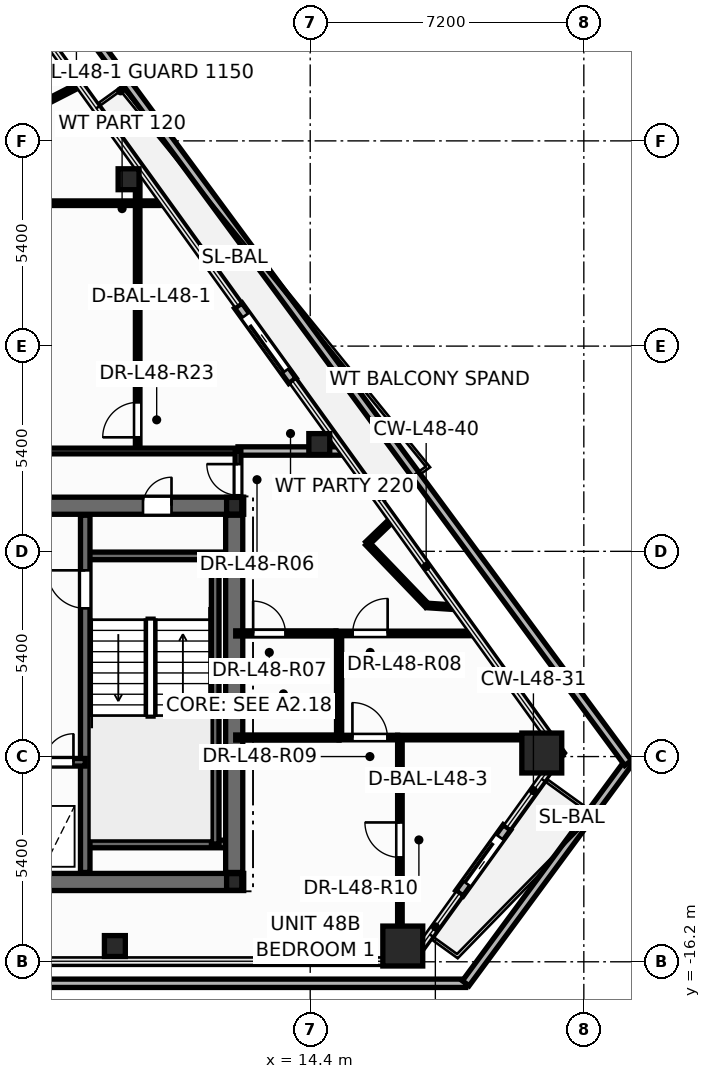
"""IFC4 building model, lengths in metres.
Left out: names, types, materials, properties, quantities, classifications, styles, units other than length and angle.
Written with IfcOpenShell. Run it as: python <this file> out.ifc"""

import sys

from ifc_helpers import new_model, si_unit, direction, frame, frame_2d, origin, origin_2d, place, context, subcontext, project, spatial, rectangle, hollow_rectangle, hollow_circle, i_section, extrude, element, fill, save


model = new_model("IFC4")
c1 = context("Model", 3, precision=1e-05, world=origin(), true_north=direction((0.0, 1.0)))
c2 = subcontext(c1, "Body", "Model", "MODEL_VIEW")
j1 = project(units=[si_unit("LENGTHUNIT", "METRE"), si_unit("PLANEANGLEUNIT", "RADIAN")], contexts=[c1])
p1 = place(None, origin())
s1 = spatial("IfcSite", under=j1, at=p1, CompositionType="ELEMENT")
p2 = place(p1, origin())
s2 = spatial("IfcBuilding", under=s1, at=p2, CompositionType="ELEMENT")
p3 = place(p2, frame((0.0, 0.0, 185.7)))
s3 = spatial("IfcBuildingStorey", under=s2, at=p3, CompositionType="ELEMENT", Elevation=185.7)
for number, where, z_axis, x_axis in (
    (1, (16.836, -15.786, 0.0), (0.0, 0.0, 1.0), (1.0, 0.0, 0.0)),
    (2, (20.494, -10.707, 0.0), (0.0, 0.0, 1.0), (1.0, 0.0, 0.0)),
):
    element("IfcColumn", number, at=place(p3, frame(where, z_axis=z_axis, x_axis=x_axis)), inside=s3, PredefinedType="COLUMN", context=c2, shape_type="SweptSolid", body=[
        extrude(hollow_rectangle(XDim=1.05, YDim=1.05, WallThickness=0.045, at=origin_2d()), origin(), (0.0, 0.0, 1.0), 3.6),
    ])
for number, where, z_axis, x_axis in (
    (3, (9.26, -15.786, 0.0), (0.0, 0.0, 1.0), (1.0, 0.0, 0.0)),
    (4, (14.639, -2.577, 0.0), (0.0, 0.0, 1.0), (1.0, 0.0, 0.0)),
    (5, (9.621, 4.391, 0.0), (0.0, 0.0, 1.0), (1.0, 0.0, 0.0)),
):
    element("IfcColumn", number, at=place(p3, frame(where, z_axis=z_axis, x_axis=x_axis)), inside=s3, PredefinedType="COLUMN", context=c2, shape_type="SweptSolid", body=[
        extrude(hollow_circle(Radius=0.275, WallThickness=0.024, at=origin_2d()), origin(), (0.0, 0.0, 1.0), 3.6),
    ])
for number, where, z_axis, x_axis in (
    (6, (12.4, -14.1, 0.0), (0.0, 0.0, 1.0), (1.0, 0.0, 0.0)),
    (7, (12.4, -4.2, 0.0), (0.0, 0.0, 1.0), (1.0, 0.0, 0.0)),
):
    element("IfcColumn", number, at=place(p3, frame(where, z_axis=z_axis, x_axis=x_axis)), inside=s3, PredefinedType="COLUMN", context=c2, shape_type="SweptSolid", body=[
        extrude(i_section(OverallWidth=0.4, OverallDepth=0.44, WebThickness=0.028, FlangeThickness=0.04, at=origin_2d()), origin(), (0.0, 0.0, 1.0), 3.6),
    ])
p4 = place(p3, frame((-18.493, -16.766, -0.02), z_axis=(0.0, 0.0, 1.0), x_axis=(1.0, 0.0, 0.0)))
e8 = element("IfcWall", 8, at=p4, inside=s3, PredefinedType="PARAPET", context=c2, shape_type="SweptSolid", body=[
    extrude(rectangle(XDim=36.985, YDim=0.22, at=frame_2d((18.493, 0.0))), origin(), (0.0, 0.0, 1.0), 1.17),
])
p5 = place(p3, frame((18.493, -16.766, -0.02), z_axis=(0.0, 0.0, 1.0), x_axis=(0.593481202181, 0.804847850627, 0.0)))
e9 = element("IfcWall", 9, at=p5, inside=s3, PredefinedType="PARAPET", context=c2, shape_type="SweptSolid", body=[
    extrude(rectangle(XDim=7.201, YDim=0.22, at=frame_2d((3.6, 0.0))), origin(), (0.0, 0.0, 1.0), 1.17),
])
p6 = place(p3, frame((22.766, -10.97, -0.02), z_axis=(0.0, 0.0, 1.0), x_axis=(-0.593493783315, 0.804838573359, 0.0)))
e10 = element("IfcWall", 10, at=p6, inside=s3, PredefinedType="PARAPET", context=c2, shape_type="SweptSolid", body=[
    extrude(rectangle(XDim=31.104, YDim=0.22, at=frame_2d((15.552, 0.0))), origin(), (0.0, 0.0, 1.0), 1.17),
])
p7 = place(p3, frame((13.934, -0.914, -0.015), z_axis=(0.0, 0.0, 1.0), x_axis=(-0.584423331063, 0.811448932533, 0.0)))
e11 = element("IfcWall", 11, at=p7, inside=s3, PredefinedType="STANDARD", context=c2, shape_type="SweptSolid", body=[
    extrude(rectangle(XDim=2.44, YDim=0.24, at=frame_2d((1.22, 0.0))), origin(), (0.0, 0.0, 1.0), 2.807),
])
p8 = place(p7, frame((0.32, 0.0, 0.015)))
e12 = element("IfcOpeningElement", 12, at=p8, cuts=e11, PredefinedType="OPENING", context=c2, shape_type="SweptSolid", body=[
    extrude(rectangle(XDim=1.806, YDim=2.204, at=frame_2d((0.9, 1.102))), frame((0.0, 0.13, 0.0), z_axis=(0.0, -1.0, 0.0), x_axis=(1.0, 0.0, 0.0)), (0.0, 0.0, 1.0), 0.26),
])
p9 = place(p3, frame((18.328, -14.399, -0.015), z_axis=(0.0, 0.0, 1.0), x_axis=(0.584352812003, 0.811499717255, 0.0)))
e13 = element("IfcWall", 13, at=p9, inside=s3, PredefinedType="STANDARD", context=c2, shape_type="SweptSolid", body=[
    extrude(rectangle(XDim=2.14, YDim=0.24, at=frame_2d((1.07, 0.0))), origin(), (0.0, 0.0, 1.0), 2.807),
])
p10 = place(p9, frame((0.32, 0.0, 0.015)))
e14 = element("IfcOpeningElement", 14, at=p10, cuts=e13, PredefinedType="OPENING", context=c2, shape_type="SweptSolid", body=[
    extrude(rectangle(XDim=1.506, YDim=2.204, at=frame_2d((0.75, 1.102))), frame((0.0, 0.13, 0.0), z_axis=(0.0, -1.0, 0.0), x_axis=(1.0, 0.0, 0.0)), (0.0, 0.0, 1.0), 0.26),
])
p11 = place(p3, frame((-12.65, -14.1, 0.0), z_axis=(0.0, 0.0, 1.0), x_axis=(1.0, 0.0, 0.0)))
e15 = element("IfcWall", 15, at=p11, inside=s3, PredefinedType="SHEAR", context=c2, shape_type="SweptSolid", body=[
    extrude(rectangle(XDim=25.3, YDim=0.45, at=frame_2d((12.65, 0.0))), origin(), (0.0, 0.0, 1.0), 3.6),
])
p12 = place(p3, frame((-12.65, -4.2, 0.0), z_axis=(0.0, 0.0, 1.0), x_axis=(1.0, 0.0, 0.0)))
e16 = element("IfcWall", 16, at=p12, inside=s3, PredefinedType="SHEAR", context=c2, shape_type="SweptSolid", body=[
    extrude(rectangle(XDim=25.3, YDim=0.45, at=frame_2d((12.65, 0.0))), origin(), (0.0, 0.0, 1.0), 3.6),
])
p13 = place(p12, frame((1.85, 0.0, 0.0)))
e17 = element("IfcOpeningElement", 17, at=p13, cuts=e16, PredefinedType="OPENING", context=c2, shape_type="SweptSolid", body=[
    extrude(rectangle(XDim=0.756, YDim=2.054, at=frame_2d((0.375, 1.027))), frame((0.0, 0.235, 0.0), z_axis=(0.0, -1.0, 0.0), x_axis=(1.0, 0.0, 0.0)), (0.0, 0.0, 1.0), 0.47),
])
p14 = place(p12, frame((22.65, 0.0, 0.0)))
e18 = element("IfcOpeningElement", 18, at=p14, cuts=e16, PredefinedType="OPENING", context=c2, shape_type="SweptSolid", body=[
    extrude(rectangle(XDim=0.756, YDim=2.054, at=frame_2d((0.375, 1.027))), frame((0.0, 0.235, 0.0), z_axis=(0.0, -1.0, 0.0), x_axis=(1.0, 0.0, 0.0)), (0.0, 0.0, 1.0), 0.47),
])
p15 = place(p12, frame((5.85, 0.0, 0.0)))
e19 = element("IfcOpeningElement", 19, at=p15, cuts=e16, PredefinedType="OPENING", context=c2, shape_type="SweptSolid", body=[
    extrude(rectangle(XDim=1.006, YDim=2.104, at=frame_2d((0.5, 1.052))), frame((0.0, 0.235, 0.0), z_axis=(0.0, -1.0, 0.0), x_axis=(1.0, 0.0, 0.0)), (0.0, 0.0, 1.0), 0.47),
])
p16 = place(p12, frame((10.35, 0.0, 0.0)))
e20 = element("IfcOpeningElement", 20, at=p16, cuts=e16, PredefinedType="OPENING", context=c2, shape_type="SweptSolid", body=[
    extrude(rectangle(XDim=1.406, YDim=2.154, at=frame_2d((0.7, 1.077))), frame((0.0, 0.235, 0.0), z_axis=(0.0, -1.0, 0.0), x_axis=(1.0, 0.0, 0.0)), (0.0, 0.0, 1.0), 0.47),
])
p17 = place(p12, frame((18.45, 0.0, 0.0)))
e21 = element("IfcOpeningElement", 21, at=p17, cuts=e16, PredefinedType="OPENING", context=c2, shape_type="SweptSolid", body=[
    extrude(rectangle(XDim=1.006, YDim=2.104, at=frame_2d((0.5, 1.052))), frame((0.0, 0.235, 0.0), z_axis=(0.0, -1.0, 0.0), x_axis=(1.0, 0.0, 0.0)), (0.0, 0.0, 1.0), 0.47),
])
for number, where, z_axis, x_axis in (
    (22, (8.48, -5.52, 0.0), (0.0, 0.0, 1.0), (1.0, 0.0, 0.0)),
    (23, (8.48, -13.1, 0.0), (0.0, 0.0, 1.0), (1.0, 0.0, 0.0)),
):
    element("IfcWall", number, at=place(p3, frame(where, z_axis=z_axis, x_axis=x_axis)), inside=s3, PredefinedType="SOLIDWALL", context=c2, shape_type="SweptSolid", body=[
        extrude(rectangle(XDim=3.87, YDim=0.2, at=frame_2d((1.935, 0.0))), origin(), (0.0, 0.0, 1.0), 3.6),
    ])
p18 = place(p3, frame((11.9, -13.1, 0.0), z_axis=(0.0, 0.0, 1.0), x_axis=(0.0, 1.0, 0.0)))
e24 = element("IfcWall", 24, at=p18, inside=s3, PredefinedType="SOLIDWALL", context=c2, shape_type="SweptSolid", body=[
    extrude(rectangle(XDim=7.58, YDim=0.2, at=frame_2d((3.79, 0.0))), origin(), (0.0, 0.0, 1.0), 3.6),
])
p19 = place(p3, frame((8.48, -13.85, 0.0), z_axis=(0.0, 0.0, 1.0), x_axis=(0.0, 1.0, 0.0)))
e25 = element("IfcWall", 25, at=p19, inside=s3, PredefinedType="SHEAR", context=c2, shape_type="SweptSolid", body=[
    extrude(rectangle(XDim=9.4, YDim=0.25, at=frame_2d((4.7, 0.0))), origin(), (0.0, 0.0, 1.0), 3.6),
])
p20 = place(p19, frame((6.95, 0.0, 0.0)))
e26 = element("IfcOpeningElement", 26, at=p20, cuts=e25, PredefinedType="OPENING", context=c2, shape_type="SweptSolid", body=[
    extrude(rectangle(XDim=1.006, YDim=2.104, at=frame_2d((0.5, 1.052))), frame((0.0, 0.135, 0.0), z_axis=(0.0, -1.0, 0.0), x_axis=(1.0, 0.0, 0.0)), (0.0, 0.0, 1.0), 0.27),
])
p21 = place(p3, frame((5.12, -10.95, 0.0), z_axis=(0.0, 0.0, 1.0), x_axis=(1.0, 0.0, 0.0)))
e27 = element("IfcWall", 27, at=p21, inside=s3, PredefinedType="SOLIDWALL", context=c2, shape_type="SweptSolid", body=[
    extrude(rectangle(XDim=3.36, YDim=0.2, at=frame_2d((1.68, 0.0))), origin(), (0.0, 0.0, 1.0), 3.6),
])
p22 = place(p21, frame((0.42, 0.0, 0.0)))
e28 = element("IfcOpeningElement", 28, at=p22, cuts=e27, PredefinedType="OPENING", context=c2, shape_type="SweptSolid", body=[
    extrude(rectangle(XDim=1.106, YDim=2.104, at=frame_2d((0.55, 1.052))), frame((0.0, 0.11, 0.0), z_axis=(0.0, -1.0, 0.0), x_axis=(1.0, 0.0, 0.0)), (0.0, 0.0, 1.0), 0.22),
])
p23 = place(p21, frame((2.3, 0.0, 0.0)))
e29 = element("IfcOpeningElement", 29, at=p23, cuts=e27, PredefinedType="OPENING", context=c2, shape_type="SweptSolid", body=[
    extrude(rectangle(XDim=0.756, YDim=2.054, at=frame_2d((0.375, 1.027))), frame((0.0, 0.11, 0.0), z_axis=(0.0, -1.0, 0.0), x_axis=(1.0, 0.0, 0.0)), (0.0, 0.0, 1.0), 0.22),
])
p24 = place(p3, frame((12.4, -13.85, 0.0), z_axis=(0.0, 0.0, 1.0), x_axis=(0.0, 1.0, 0.0)))
e30 = element("IfcWall", 30, at=p24, inside=s3, PredefinedType="SHEAR", context=c2, shape_type="SweptSolid", body=[
    extrude(rectangle(XDim=9.4, YDim=0.45, at=frame_2d((4.7, 0.0))), origin(), (0.0, 0.0, 1.0), 3.6),
])
p25 = place(p3, frame((9.86, -2.76, 0.0), z_axis=(0.0, 0.0, 1.0), x_axis=(0.0, 1.0, 0.0)))
e31 = element("IfcWall", 31, at=p25, inside=s3, PredefinedType="PARTITIONING", context=c2, shape_type="SweptSolid", body=[
    extrude(rectangle(XDim=7.503, YDim=0.12, at=frame_2d((3.751, 0.0))), origin(), (0.0, 0.0, 1.0), 2.325),
])
p26 = place(p25, frame((0.36, 0.0, 0.0)))
e32 = element("IfcOpeningElement", 32, at=p26, cuts=e31, PredefinedType="OPENING", context=c2, shape_type="SweptSolid", body=[
    extrude(rectangle(XDim=0.926, YDim=2.104, at=frame_2d((0.46, 1.052))), frame((0.0, 0.07, 0.0), z_axis=(0.0, -1.0, 0.0), x_axis=(1.0, 0.0, 0.0)), (0.0, 0.0, 1.0), 0.14),
])
p27 = place(p3, frame((16.76, -16.186, 0.0), z_axis=(0.0, 0.0, 1.0), x_axis=(0.0, 1.0, 0.0)))
e33 = element("IfcWall", 33, at=p27, inside=s3, PredefinedType="PARTITIONING", context=c2, shape_type="SweptSolid", body=[
    extrude(rectangle(XDim=5.885, YDim=0.12, at=frame_2d((2.943, 0.0))), origin(), (0.0, 0.0, 1.0), 2.325),
])
p28 = place(p27, frame((2.732, 0.0, 0.0)))
e34 = element("IfcOpeningElement", 34, at=p28, cuts=e33, PredefinedType="OPENING", context=c2, shape_type="SweptSolid", body=[
    extrude(rectangle(XDim=0.926, YDim=2.104, at=frame_2d((0.46, 1.052))), frame((0.0, 0.07, 0.0), z_axis=(0.0, -1.0, 0.0), x_axis=(1.0, 0.0, 0.0)), (0.0, 0.0, 1.0), 0.14),
])
p29 = place(p3, frame((5.16, 3.76, 0.0), z_axis=(0.0, 0.0, 1.0), x_axis=(1.0, 0.0, 0.0)))
e35 = element("IfcWall", 35, at=p29, inside=s3, PredefinedType="PARTITIONING", context=c2, shape_type="SweptSolid", body=[
    extrude(rectangle(XDim=5.408, YDim=0.12, at=frame_2d((2.704, 0.0))), origin(), (0.0, 0.0, 1.0), 2.325),
])
p30 = place(p29, frame((0.4, 0.0, 0.0)))
e36 = element("IfcOpeningElement", 36, at=p30, cuts=e35, PredefinedType="OPENING", context=c2, shape_type="SweptSolid", body=[
    extrude(rectangle(XDim=0.926, YDim=2.104, at=frame_2d((0.46, 1.052))), frame((0.0, 0.07, 0.0), z_axis=(0.0, -1.0, 0.0), x_axis=(1.0, 0.0, 0.0)), (0.0, 0.0, 1.0), 0.14),
])
p31 = place(p3, frame((-4.398, -2.76, 0.0), z_axis=(0.0, 0.0, 1.0), x_axis=(1.0, 0.0, 0.0)))
e37 = element("IfcWall", 37, at=p31, inside=s3, PredefinedType="PARTITIONING", context=c2, shape_type="SweptSolid", body=[
    extrude(rectangle(XDim=16.898, YDim=0.15, at=frame_2d((8.449, 0.0))), origin(), (0.0, 0.0, 1.0), 2.325),
])
p32 = place(p3, frame((16.7, -10.3, 0.0), z_axis=(0.0, 0.0, 1.0), x_axis=(1.0, 0.0, 0.0)))
e38 = element("IfcWall", 38, at=p32, inside=s3, PredefinedType="PARTITIONING", context=c2, shape_type="SweptSolid", body=[
    extrude(rectangle(XDim=3.994, YDim=0.12, at=frame_2d((1.997, 0.0))), origin(), (0.0, 0.0, 1.0), 2.325),
])
p33 = place(p3, frame((15.08, -7.56, 0.0), z_axis=(0.0, 0.0, 1.0), x_axis=(1.0, 0.0, 0.0)))
e39 = element("IfcWall", 39, at=p33, inside=s3, PredefinedType="PARTITIONING", context=c2, shape_type="SweptSolid", body=[
    extrude(rectangle(XDim=3.64, YDim=0.12, at=frame_2d((1.82, 0.0))), origin(), (0.0, 0.0, 1.0), 2.325),
])
p34 = place(p33, frame((0.438, 0.0, 0.0)))
e40 = element("IfcOpeningElement", 40, at=p34, cuts=e39, PredefinedType="OPENING", context=c2, shape_type="SweptSolid", body=[
    extrude(rectangle(XDim=0.926, YDim=2.104, at=frame_2d((0.46, 1.052))), frame((0.0, 0.07, 0.0), z_axis=(0.0, -1.0, 0.0), x_axis=(1.0, 0.0, 0.0)), (0.0, 0.0, 1.0), 0.14),
])
p35 = place(p3, frame((12.5, -2.76, 0.0), z_axis=(0.0, 0.0, 1.0), x_axis=(1.0, 0.0, 0.0)))
e41 = element("IfcWall", 41, at=p35, inside=s3, PredefinedType="PARTITIONING", context=c2, shape_type="SweptSolid", body=[
    extrude(rectangle(XDim=2.763, YDim=0.22, at=frame_2d((1.382, 0.0))), origin(), (0.0, 0.0, 1.0), 2.325),
])
p36 = place(p3, frame((12.44, -7.56, 0.0), z_axis=(0.0, 0.0, 1.0), x_axis=(1.0, 0.0, 0.0)))
e42 = element("IfcWall", 42, at=p36, inside=s3, PredefinedType="PARTITIONING", context=c2, shape_type="SweptSolid", body=[
    extrude(rectangle(XDim=2.638, YDim=0.135, at=frame_2d((1.319, 0.0))), origin(), (0.0, 0.0, 1.0), 2.792),
])
p37 = place(p36, frame((0.458, 0.0, 0.0)))
e43 = element("IfcOpeningElement", 43, at=p37, cuts=e42, PredefinedType="OPENING", context=c2, shape_type="SweptSolid", body=[
    extrude(rectangle(XDim=0.856, YDim=2.104, at=frame_2d((0.425, 1.052))), frame((0.0, 0.078, 0.0), z_axis=(0.0, -1.0, 0.0), x_axis=(1.0, 0.0, 0.0)), (0.0, 0.0, 1.0), 0.155),
])
p38 = place(p3, frame((15.16, -10.3, 0.0), z_axis=(0.0, 0.0, 1.0), x_axis=(0.0, 1.0, 0.0)))
e44 = element("IfcWall", 44, at=p38, inside=s3, PredefinedType="PARTITIONING", context=c2, shape_type="SweptSolid", body=[
    extrude(rectangle(XDim=2.74, YDim=0.135, at=frame_2d((1.37, 0.0))), origin(), (0.0, 0.0, 1.0), 3.35),
])
p39 = place(p3, frame((12.44, -10.3, 0.0), z_axis=(0.0, 0.0, 1.0), x_axis=(1.0, 0.0, 0.0)))
e45 = element("IfcWall", 45, at=p39, inside=s3, PredefinedType="PARTITIONING", context=c2, shape_type="SweptSolid", body=[
    extrude(rectangle(XDim=2.72, YDim=0.135, at=frame_2d((1.36, 0.0))), origin(), (0.0, 0.0, 1.0), 2.792),
])
p40 = place(p3, frame((17.471, -6.823, 0.0), z_axis=(0.0, 0.0, 1.0), x_axis=(-0.692938318289, 0.720996870345, 0.0)))
e46 = element("IfcWall", 46, at=p40, inside=s3, PredefinedType="PARTITIONING", context=c2, shape_type="SweptSolid", body=[
    extrude(rectangle(XDim=2.262, YDim=0.12, at=frame_2d((1.131, 0.0))), origin(), (0.0, 0.0, 1.0), 3.35),
])
p41 = place(p3, frame((15.16, -10.3, 0.0), z_axis=(0.0, 0.0, 1.0), x_axis=(1.0, 0.0, 0.0)))
e47 = element("IfcWall", 47, at=p41, inside=s3, PredefinedType="PARTITIONING", context=c2, shape_type="SweptSolid", body=[
    extrude(rectangle(XDim=1.538, YDim=0.12, at=frame_2d((0.769, 0.0))), origin(), (0.0, 0.0, 1.0), 3.35),
])
p42 = place(p41, frame((0.351, 0.0, 0.0)))
e48 = element("IfcOpeningElement", 48, at=p42, cuts=e47, PredefinedType="OPENING", context=c2, shape_type="SweptSolid", body=[
    extrude(rectangle(XDim=0.926, YDim=2.104, at=frame_2d((0.46, 1.052))), frame((0.0, 0.07, 0.0), z_axis=(0.0, -1.0, 0.0), x_axis=(1.0, 0.0, 0.0)), (0.0, 0.0, 1.0), 0.14),
])
p43 = place(p3, frame((12.5, -4.24, 0.0), z_axis=(0.0, 0.0, 1.0), x_axis=(0.0, 1.0, 0.0)))
e49 = element("IfcWall", 49, at=p43, inside=s3, PredefinedType="PARTITIONING", context=c2, shape_type="SweptSolid", body=[
    extrude(rectangle(XDim=1.48, YDim=0.15, at=frame_2d((0.74, 0.0))), origin(), (0.0, 0.0, 1.0), 2.325),
])
p44 = place(p43, frame((0.315, 0.0, 0.0)))
e50 = element("IfcOpeningElement", 50, at=p44, cuts=e49, PredefinedType="OPENING", context=c2, shape_type="SweptSolid", body=[
    extrude(rectangle(XDim=0.826, YDim=2.104, at=frame_2d((0.41, 1.052))), frame((0.0, 0.085, 0.0), z_axis=(0.0, -1.0, 0.0), x_axis=(1.0, 0.0, 0.0)), (0.0, 0.0, 1.0), 0.17),
])
p45 = place(p3, frame((15.903, -5.192, 0.0), z_axis=(0.0, 0.0, 1.0), x_axis=(0.72092156137, 0.693016668164, 0.0)))
e51 = element("IfcWall", 51, at=p45, inside=s3, PredefinedType="PARTITIONING", context=c2, shape_type="SweptSolid", body=[
    extrude(rectangle(XDim=0.901, YDim=0.12, at=frame_2d((0.451, 0.0))), origin(), (0.0, 0.0, 1.0), 2.792),
])
p46 = place(p3, frame((8.319, 6.866, 0.0), z_axis=(0.0, 0.0, 1.0), x_axis=(-0.889930495704, -0.456096166194, 0.0)))
e52 = element("IfcWall", 52, at=p46, inside=s3, PredefinedType="PARTITIONING", context=c2, shape_type="SweptSolid", body=[
    extrude(rectangle(XDim=0.899, YDim=0.12, at=frame_2d((0.45, 0.0))), origin(), (0.0, 0.0, 1.0), 2.792),
])
p47 = place(p3, frame((18.213, -6.873, 0.0), z_axis=(0.0, 0.0, 1.0), x_axis=(-0.997799657242, 0.066301161435, 0.0)))
e53 = element("IfcWall", 53, at=p47, inside=s3, PredefinedType="PARTITIONING", context=c2, shape_type="SweptSolid", body=[
    extrude(rectangle(XDim=0.744, YDim=0.12, at=frame_2d((0.372, 0.0))), origin(), (0.0, 0.0, 1.0), 2.792),
])
p48 = place(p8, origin())
e54 = element("IfcDoor", 54, at=p48, inside=s3, OperationType="SLIDING_TO_LEFT", PredefinedType="DOOR", context=c2, shape_type="SweptSolid", body=[
    extrude(rectangle(XDim=1.8, YDim=2.2, at=frame_2d((0.9, 1.1))), frame((0.0, 0.025, 0.0), z_axis=(0.0, -1.0, 0.0), x_axis=(1.0, 0.0, 0.0)), (0.0, 0.0, 1.0), 0.05),
])
fill(e12, e54)
p49 = place(p10, origin())
e55 = element("IfcDoor", 55, at=p49, inside=s3, OperationType="SLIDING_TO_RIGHT", PredefinedType="DOOR", context=c2, shape_type="SweptSolid", body=[
    extrude(rectangle(XDim=1.5, YDim=2.2, at=frame_2d((0.75, 1.1))), frame((0.0, 0.025, 0.0), z_axis=(0.0, -1.0, 0.0), x_axis=(1.0, 0.0, 0.0)), (0.0, 0.0, 1.0), 0.05),
])
fill(e14, e55)
p50 = place(p20, origin())
e56 = element("IfcDoor", 56, at=p50, inside=s3, OperationType="SINGLE_SWING_RIGHT", PredefinedType="DOOR", context=c2, shape_type="SweptSolid", body=[
    extrude(rectangle(XDim=1.0, YDim=2.1, at=frame_2d((0.5, 1.05))), frame((0.0, 0.025, 0.0), z_axis=(0.0, -1.0, 0.0), x_axis=(1.0, 0.0, 0.0)), (0.0, 0.0, 1.0), 0.05),
])
fill(e26, e56)
p51 = place(p23, origin())
e57 = element("IfcDoor", 57, at=p51, inside=s3, OperationType="SINGLE_SWING_RIGHT", PredefinedType="DOOR", context=c2, shape_type="SweptSolid", body=[
    extrude(rectangle(XDim=0.75, YDim=2.05, at=frame_2d((0.375, 1.025))), frame((0.0, 0.025, 0.0), z_axis=(0.0, -1.0, 0.0), x_axis=(1.0, 0.0, 0.0)), (0.0, 0.0, 1.0), 0.05),
])
fill(e29, e57)
p52 = place(p14, origin())
e58 = element("IfcDoor", 58, at=p52, inside=s3, OperationType="SINGLE_SWING_RIGHT", PredefinedType="DOOR", context=c2, shape_type="SweptSolid", body=[
    extrude(rectangle(XDim=0.75, YDim=2.05, at=frame_2d((0.375, 1.025))), frame((0.0, 0.025, 0.0), z_axis=(0.0, -1.0, 0.0), x_axis=(1.0, 0.0, 0.0)), (0.0, 0.0, 1.0), 0.05),
])
fill(e18, e58)
p53 = place(p44, origin())
e59 = element("IfcDoor", 59, at=p53, inside=s3, OperationType="SINGLE_SWING_RIGHT", PredefinedType="DOOR", context=c2, shape_type="SweptSolid", body=[
    extrude(rectangle(XDim=0.82, YDim=2.1, at=frame_2d((0.41, 1.05))), frame((0.0, 0.025, 0.0), z_axis=(0.0, -1.0, 0.0), x_axis=(1.0, 0.0, 0.0)), (0.0, 0.0, 1.0), 0.05),
])
fill(e50, e59)
p54 = place(p37, origin())
e60 = element("IfcDoor", 60, at=p54, inside=s3, OperationType="SINGLE_SWING_LEFT", PredefinedType="DOOR", context=c2, shape_type="SweptSolid", body=[
    extrude(rectangle(XDim=0.85, YDim=2.1, at=frame_2d((0.425, 1.05))), frame((0.0, 0.025, 0.0), z_axis=(0.0, -1.0, 0.0), x_axis=(1.0, 0.0, 0.0)), (0.0, 0.0, 1.0), 0.05),
])
fill(e43, e60)
p55 = place(p34, origin())
e61 = element("IfcDoor", 61, at=p55, inside=s3, OperationType="SINGLE_SWING_RIGHT", PredefinedType="DOOR", context=c2, shape_type="SweptSolid", body=[
    extrude(rectangle(XDim=0.92, YDim=2.1, at=frame_2d((0.46, 1.05))), frame((0.0, 0.025, 0.0), z_axis=(0.0, -1.0, 0.0), x_axis=(1.0, 0.0, 0.0)), (0.0, 0.0, 1.0), 0.05),
])
fill(e40, e61)
p56 = place(p42, origin())
e62 = element("IfcDoor", 62, at=p56, inside=s3, OperationType="SINGLE_SWING_LEFT", PredefinedType="DOOR", context=c2, shape_type="SweptSolid", body=[
    extrude(rectangle(XDim=0.92, YDim=2.1, at=frame_2d((0.46, 1.05))), frame((0.0, 0.025, 0.0), z_axis=(0.0, -1.0, 0.0), x_axis=(1.0, 0.0, 0.0)), (0.0, 0.0, 1.0), 0.05),
])
fill(e48, e62)
p57 = place(p28, origin())
e63 = element("IfcDoor", 63, at=p57, inside=s3, OperationType="SINGLE_SWING_RIGHT", PredefinedType="DOOR", context=c2, shape_type="SweptSolid", body=[
    extrude(rectangle(XDim=0.92, YDim=2.1, at=frame_2d((0.46, 1.05))), frame((0.0, 0.025, 0.0), z_axis=(0.0, -1.0, 0.0), x_axis=(1.0, 0.0, 0.0)), (0.0, 0.0, 1.0), 0.05),
])
fill(e34, e63)
p58 = place(p26, origin())
e64 = element("IfcDoor", 64, at=p58, inside=s3, OperationType="SINGLE_SWING_LEFT", PredefinedType="DOOR", context=c2, shape_type="SweptSolid", body=[
    extrude(rectangle(XDim=0.92, YDim=2.1, at=frame_2d((0.46, 1.05))), frame((0.0, 0.025, 0.0), z_axis=(0.0, -1.0, 0.0), x_axis=(1.0, 0.0, 0.0)), (0.0, 0.0, 1.0), 0.05),
])
fill(e32, e64)
save(model, sys.argv[1])
